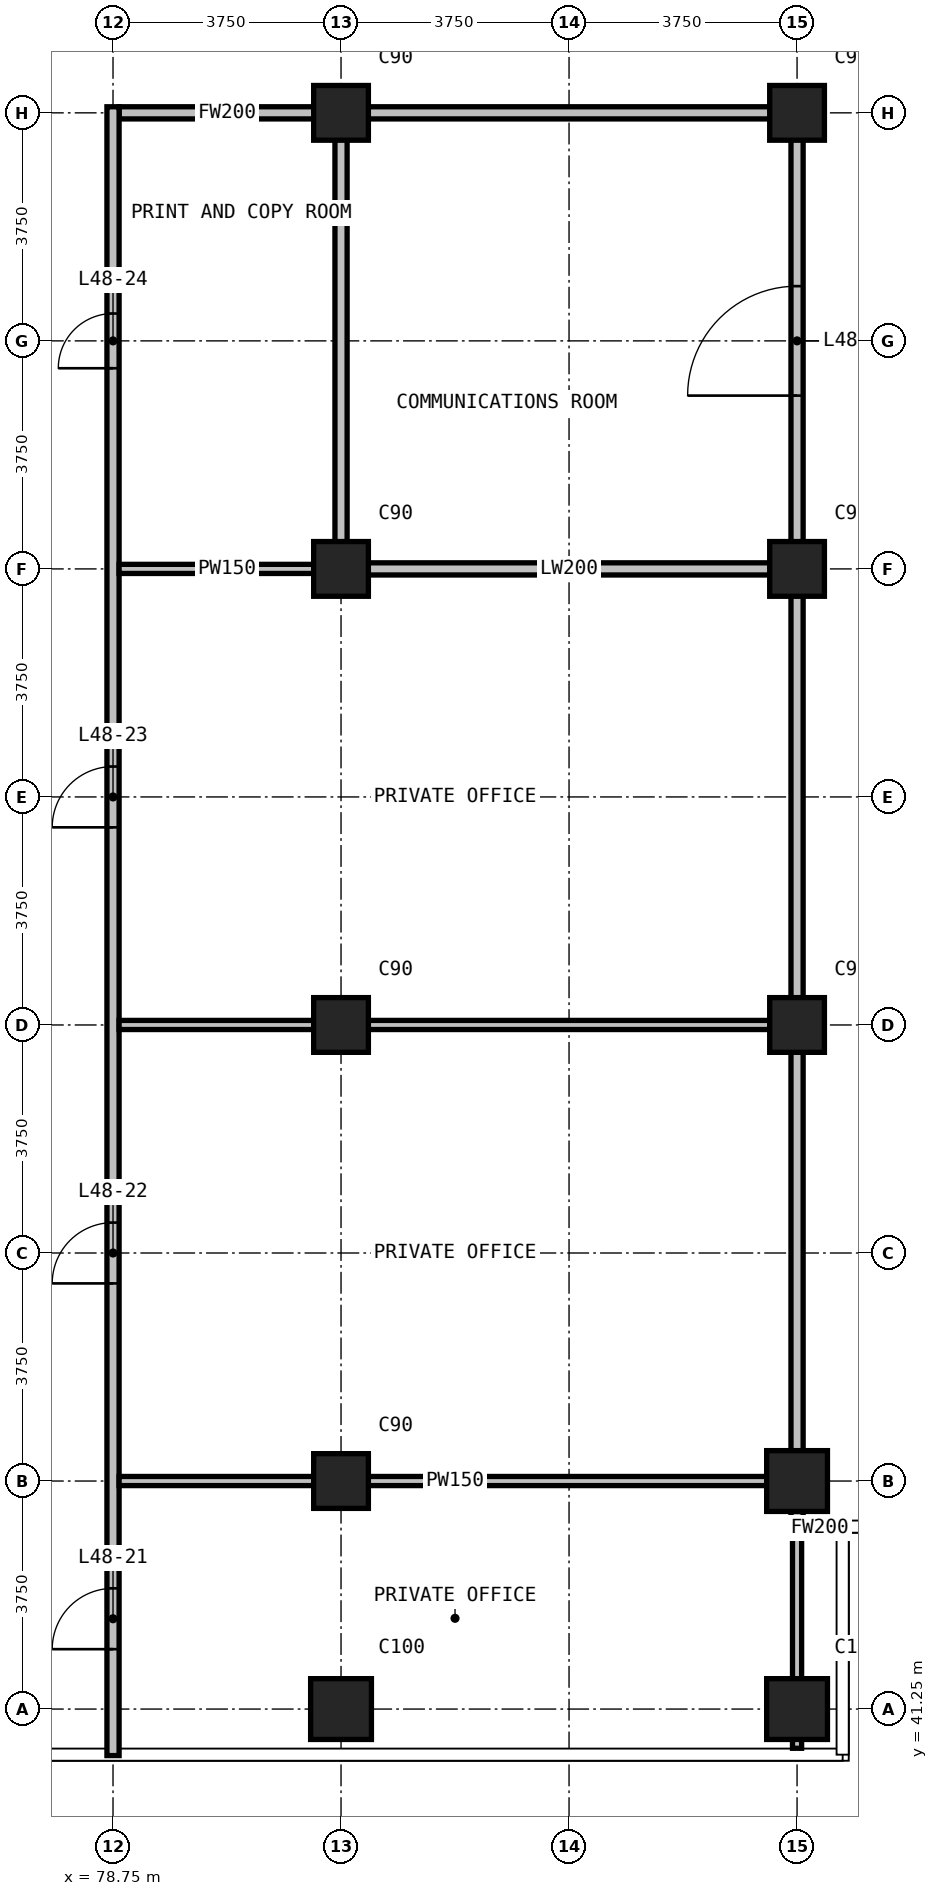
"""IFC4 building model, lengths in metres.
Left out: names, types, materials, properties, quantities, classifications, styles, units other than length and angle.
Written with IfcOpenShell. Run it as: python <this file> out.ifc"""

import sys

from ifc_helpers import new_model, si_unit, direction, frame, frame_2d, origin, origin_2d, place, context, subcontext, project, spatial, rectangle, extrude, element, fill, save


model = new_model("IFC4")
c1 = context("Model", 3, precision=1e-05, world=origin(), true_north=direction((0.0, 1.0)))
c2 = subcontext(c1, "Body", "Model", "MODEL_VIEW")
j1 = project(units=[si_unit("LENGTHUNIT", "METRE"), si_unit("PLANEANGLEUNIT", "RADIAN")], contexts=[c1])
p1 = place(None, origin())
s1 = spatial("IfcSite", under=j1, at=p1, CompositionType="ELEMENT")
p2 = place(p1, origin())
s2 = spatial("IfcBuilding", under=s1, at=p2, CompositionType="ELEMENT")
p3 = place(p2, frame((0.0, 0.0, 188.7)))
s3 = spatial("IfcBuildingStorey", under=s2, at=p3, CompositionType="ELEMENT", Elevation=188.7)
p4 = place(p3, frame((82.5, 41.25, 0.0), z_axis=(0.0, 0.0, 1.0), x_axis=(1.0, 0.0, 0.0)))
e1 = element("IfcColumn", 1, at=p4, inside=s3, PredefinedType="COLUMN", context=c2, shape_type="SweptSolid", body=[
    extrude(rectangle(XDim=1.0, YDim=1.0, at=origin_2d()), origin(), (0.0, 0.0, 1.0), 3.6),
])
for number, where, z_axis, x_axis in (
    (2, (82.5, 45.0, 0.0), (0.0, 0.0, 1.0), (1.0, 0.0, 0.0)),
    (3, (82.5, 52.5, 0.0), (0.0, 0.0, 1.0), (1.0, 0.0, 0.0)),
    (4, (82.5, 60.0, 0.0), (0.0, 0.0, 1.0), (1.0, 0.0, 0.0)),
    (5, (82.5, 67.5, 0.0), (0.0, 0.0, 1.0), (1.0, 0.0, 0.0)),
):
    element("IfcColumn", number, at=place(p3, frame(where, z_axis=z_axis, x_axis=x_axis)), inside=s3, PredefinedType="COLUMN", context=c2, shape_type="SweptSolid", body=[
        extrude(rectangle(XDim=0.9, YDim=0.9, at=origin_2d()), origin(), (0.0, 0.0, 1.0), 3.6),
    ])
for number, where, z_axis, x_axis in (
    (6, (90.0, 41.25, 0.0), (0.0, 0.0, 1.0), (1.0, 0.0, 0.0)),
    (7, (90.0, 45.0, 0.0), (0.0, 0.0, 1.0), (1.0, 0.0, 0.0)),
):
    element("IfcColumn", number, at=place(p3, frame(where, z_axis=z_axis, x_axis=x_axis)), inside=s3, PredefinedType="COLUMN", context=c2, shape_type="SweptSolid", body=[
        extrude(rectangle(XDim=1.0, YDim=1.0, at=origin_2d()), origin(), (0.0, 0.0, 1.0), 3.6),
    ])
for number, where, z_axis, x_axis in (
    (8, (90.0, 52.5, 0.0), (0.0, 0.0, 1.0), (1.0, 0.0, 0.0)),
    (9, (90.0, 60.0, 0.0), (0.0, 0.0, 1.0), (1.0, 0.0, 0.0)),
    (10, (90.0, 67.5, 0.0), (0.0, 0.0, 1.0), (1.0, 0.0, 0.0)),
):
    element("IfcColumn", number, at=place(p3, frame(where, z_axis=z_axis, x_axis=x_axis)), inside=s3, PredefinedType="COLUMN", context=c2, shape_type="SweptSolid", body=[
        extrude(rectangle(XDim=0.9, YDim=0.9, at=origin_2d()), origin(), (0.0, 0.0, 1.0), 3.6),
    ])
for number, where, z_axis, x_axis in (
    (11, (82.6, 60.0, 0.0), (0.0, 0.0, 1.0), (1.0, 0.0, 0.0)),
    (12, (82.6, 67.5, 0.0), (0.0, 0.0, 1.0), (1.0, 0.0, 0.0)),
):
    element("IfcWall", number, at=place(p3, frame(where, z_axis=z_axis, x_axis=x_axis)), inside=s3, PredefinedType="PARTITIONING", context=c2, shape_type="SweptSolid", body=[
        extrude(rectangle(XDim=7.3, YDim=0.2, at=frame_2d((3.65, 0.0))), origin(), (0.0, 0.0, 1.0), 3.3),
    ])
p5 = place(p3, frame((82.5, 59.9, 0.0), z_axis=(0.0, 0.0, 1.0), x_axis=(0.0, 1.0, 0.0)))
e13 = element("IfcWall", 13, at=p5, inside=s3, PredefinedType="PARTITIONING", context=c2, shape_type="SweptSolid", body=[
    extrude(rectangle(XDim=7.7, YDim=0.2, at=frame_2d((3.85, 0.0))), origin(), (0.0, 0.0, 1.0), 3.3),
])
p6 = place(p3, frame((90.0, 59.9, 0.0), z_axis=(0.0, 0.0, 1.0), x_axis=(0.0, 1.0, 0.0)))
e14 = element("IfcWall", 14, at=p6, inside=s3, PredefinedType="PARTITIONING", context=c2, shape_type="SweptSolid", body=[
    extrude(rectangle(XDim=7.7, YDim=0.2, at=frame_2d((3.85, 0.0))), origin(), (0.0, 0.0, 1.0), 3.3),
])
p7 = place(p6, frame((2.95, 0.0, 0.0)))
e15 = element("IfcOpeningElement", 15, at=p7, cuts=e14, PredefinedType="OPENING", context=c2, shape_type="SweptSolid", body=[
    extrude(rectangle(XDim=1.8, YDim=2.4, at=frame_2d((0.9, 1.2))), frame((0.0, 0.11, 0.0), z_axis=(0.0, -1.0, 0.0), x_axis=(1.0, 0.0, 0.0)), (0.0, 0.0, 1.0), 0.22),
])
p8 = place(p3, frame((90.1, 44.235, 0.0), z_axis=(0.0, 0.0, 1.0), x_axis=(1.0, 0.0, 0.0)))
e16 = element("IfcWall", 16, at=p8, inside=s3, PredefinedType="PARTITIONING", context=c2, shape_type="SweptSolid", body=[
    extrude(rectangle(XDim=0.545, YDim=0.2, at=frame_2d((0.272, 0.0))), origin(), (0.0, 0.0, 1.0), 3.3),
])
p9 = place(p3, frame((78.85, 67.5, 0.0), z_axis=(0.0, 0.0, 1.0), x_axis=(1.0, 0.0, 0.0)))
e17 = element("IfcWall", 17, at=p9, inside=s3, PredefinedType="PARTITIONING", context=c2, shape_type="SweptSolid", body=[
    extrude(rectangle(XDim=3.55, YDim=0.2, at=frame_2d((1.775, 0.0))), origin(), (0.0, 0.0, 1.0), 3.3),
])
p10 = place(p3, frame((78.75, 40.485, 0.0), z_axis=(0.0, 0.0, 1.0), x_axis=(0.0, 1.0, 0.0)))
e18 = element("IfcWall", 18, at=p10, inside=s3, PredefinedType="PARTITIONING", context=c2, shape_type="SweptSolid", body=[
    extrude(rectangle(XDim=27.115, YDim=0.2, at=frame_2d((13.558, 0.0))), origin(), (0.0, 0.0, 1.0), 3.3),
])
p11 = place(p10, frame((1.75, 0.0, 0.0)))
e19 = element("IfcOpeningElement", 19, at=p11, cuts=e18, PredefinedType="OPENING", context=c2, shape_type="SweptSolid", body=[
    extrude(rectangle(XDim=1.0, YDim=2.2, at=frame_2d((0.5, 1.1))), frame((0.0, 0.11, 0.0), z_axis=(0.0, -1.0, 0.0), x_axis=(1.0, 0.0, 0.0)), (0.0, 0.0, 1.0), 0.22),
])
p12 = place(p10, frame((7.765, 0.0, 0.0)))
e20 = element("IfcOpeningElement", 20, at=p12, cuts=e18, PredefinedType="OPENING", context=c2, shape_type="SweptSolid", body=[
    extrude(rectangle(XDim=1.0, YDim=2.2, at=frame_2d((0.5, 1.1))), frame((0.0, 0.11, 0.0), z_axis=(0.0, -1.0, 0.0), x_axis=(1.0, 0.0, 0.0)), (0.0, 0.0, 1.0), 0.22),
])
p13 = place(p10, frame((15.265, 0.0, 0.0)))
e21 = element("IfcOpeningElement", 21, at=p13, cuts=e18, PredefinedType="OPENING", context=c2, shape_type="SweptSolid", body=[
    extrude(rectangle(XDim=1.0, YDim=2.2, at=frame_2d((0.5, 1.1))), frame((0.0, 0.11, 0.0), z_axis=(0.0, -1.0, 0.0), x_axis=(1.0, 0.0, 0.0)), (0.0, 0.0, 1.0), 0.22),
])
p14 = place(p10, frame((22.815, 0.0, 0.0)))
e22 = element("IfcOpeningElement", 22, at=p14, cuts=e18, PredefinedType="OPENING", context=c2, shape_type="SweptSolid", body=[
    extrude(rectangle(XDim=0.9, YDim=2.2, at=frame_2d((0.45, 1.1))), frame((0.0, 0.11, 0.0), z_axis=(0.0, -1.0, 0.0), x_axis=(1.0, 0.0, 0.0)), (0.0, 0.0, 1.0), 0.22),
])
p15 = place(p3, frame((90.0, 44.135, 0.0), z_axis=(0.0, 0.0, 1.0), x_axis=(0.0, 1.0, 0.0)))
e23 = element("IfcWall", 23, at=p15, inside=s3, PredefinedType="PARTITIONING", context=c2, shape_type="SweptSolid", body=[
    extrude(rectangle(XDim=15.865, YDim=0.2, at=frame_2d((7.933, 0.0))), origin(), (0.0, 0.0, 1.0), 3.3),
])
for number, where, z_axis, x_axis in (
    (24, (78.85, 45.0, 0.0), (0.0, 0.0, 1.0), (1.0, 0.0, 0.0)),
    (25, (78.85, 52.5, 0.0), (0.0, 0.0, 1.0), (1.0, 0.0, 0.0)),
):
    element("IfcWall", number, at=place(p3, frame(where, z_axis=z_axis, x_axis=x_axis)), inside=s3, PredefinedType="PARTITIONING", context=c2, shape_type="SweptSolid", body=[
        extrude(rectangle(XDim=11.05, YDim=0.15, at=frame_2d((5.525, 0.0))), origin(), (0.0, 0.0, 1.0), 3.3),
    ])
p16 = place(p3, frame((78.85, 60.0, 0.0), z_axis=(0.0, 0.0, 1.0), x_axis=(1.0, 0.0, 0.0)))
e26 = element("IfcWall", 26, at=p16, inside=s3, PredefinedType="PARTITIONING", context=c2, shape_type="SweptSolid", body=[
    extrude(rectangle(XDim=3.55, YDim=0.15, at=frame_2d((1.775, 0.0))), origin(), (0.0, 0.0, 1.0), 3.3),
])
p17 = place(p3, frame((90.0, 40.605, 0.0), z_axis=(0.0, 0.0, 1.0), x_axis=(0.0, 1.0, 0.0)))
e27 = element("IfcWall", 27, at=p17, inside=s3, PredefinedType="PARTITIONING", context=c2, shape_type="SweptSolid", body=[
    extrude(rectangle(XDim=3.6, YDim=0.15, at=frame_2d((1.8, 0.0))), origin(), (0.0, 0.0, 1.0), 3.3),
])
p18 = place(p11, origin())
e28 = element("IfcDoor", 28, at=p18, inside=s3, OperationType="SINGLE_SWING_LEFT", PredefinedType="DOOR", context=c2, shape_type="SweptSolid", body=[
    extrude(rectangle(XDim=1.0, YDim=2.2, at=frame_2d((0.5, 1.1))), frame((0.0, 0.025, 0.0), z_axis=(0.0, -1.0, 0.0), x_axis=(1.0, 0.0, 0.0)), (0.0, 0.0, 1.0), 0.05),
])
fill(e19, e28)
p19 = place(p12, origin())
e29 = element("IfcDoor", 29, at=p19, inside=s3, OperationType="SINGLE_SWING_RIGHT", PredefinedType="DOOR", context=c2, shape_type="SweptSolid", body=[
    extrude(rectangle(XDim=1.0, YDim=2.2, at=frame_2d((0.5, 1.1))), frame((0.0, 0.025, 0.0), z_axis=(0.0, -1.0, 0.0), x_axis=(1.0, 0.0, 0.0)), (0.0, 0.0, 1.0), 0.05),
])
fill(e20, e29)
p20 = place(p13, origin())
e30 = element("IfcDoor", 30, at=p20, inside=s3, OperationType="SINGLE_SWING_LEFT", PredefinedType="DOOR", context=c2, shape_type="SweptSolid", body=[
    extrude(rectangle(XDim=1.0, YDim=2.2, at=frame_2d((0.5, 1.1))), frame((0.0, 0.025, 0.0), z_axis=(0.0, -1.0, 0.0), x_axis=(1.0, 0.0, 0.0)), (0.0, 0.0, 1.0), 0.05),
])
fill(e21, e30)
p21 = place(p14, origin())
e31 = element("IfcDoor", 31, at=p21, inside=s3, OperationType="SINGLE_SWING_LEFT", PredefinedType="DOOR", context=c2, shape_type="SweptSolid", body=[
    extrude(rectangle(XDim=0.9, YDim=2.2, at=frame_2d((0.45, 1.1))), frame((0.0, 0.025, 0.0), z_axis=(0.0, -1.0, 0.0), x_axis=(1.0, 0.0, 0.0)), (0.0, 0.0, 1.0), 0.05),
])
fill(e22, e31)
p22 = place(p7, origin())
e32 = element("IfcDoor", 32, at=p22, inside=s3, OperationType="DOUBLE_DOOR_SINGLE_SWING", PredefinedType="DOOR", context=c2, shape_type="SweptSolid", body=[
    extrude(rectangle(XDim=1.8, YDim=2.4, at=frame_2d((0.9, 1.2))), frame((0.0, 0.025, 0.0), z_axis=(0.0, -1.0, 0.0), x_axis=(1.0, 0.0, 0.0)), (0.0, 0.0, 1.0), 0.05),
])
fill(e15, e32)
save(model, sys.argv[1])
